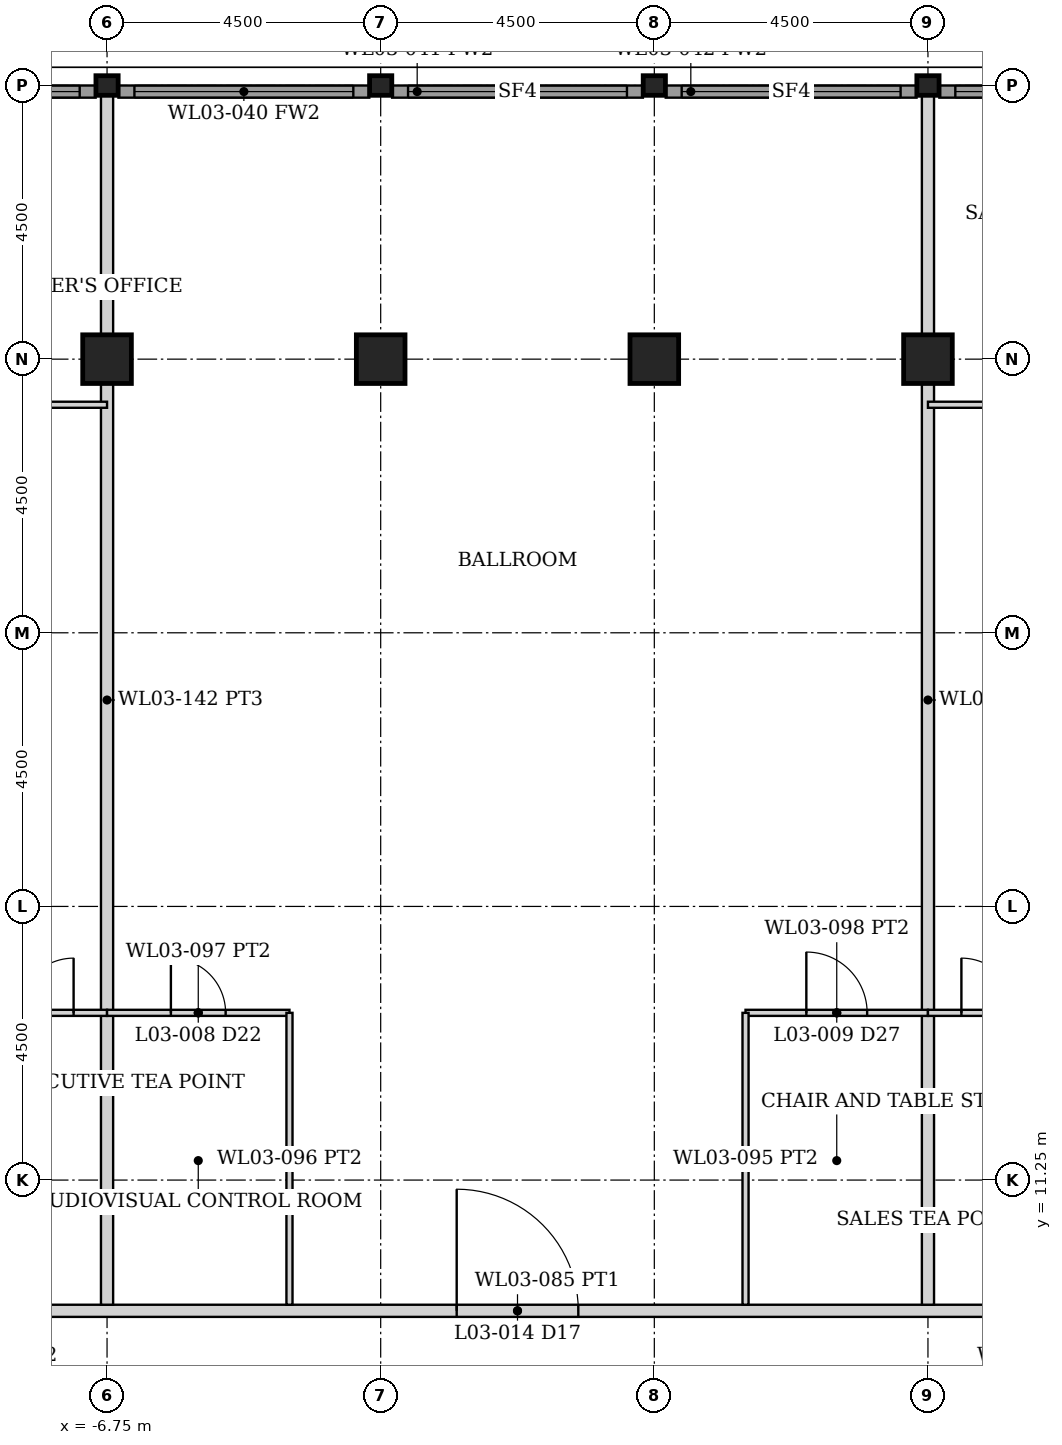
"""IFC4 building model, lengths in metres.
Left out: names, types, materials, properties, quantities, classifications, styles, units other than length and angle.
Written with IfcOpenShell. Run it as: python <this file> out.ifc"""

import sys

from ifc_helpers import new_model, si_unit, direction, frame, frame_2d, origin, origin_2d, place, context, subcontext, project, spatial, rectangle, hollow_rectangle, i_section, extrude, element, fill, save


model = new_model("IFC4")
c1 = context("Model", 3, precision=1e-05, world=origin(), true_north=direction((0.0, 1.0)))
c2 = subcontext(c1, "Body", "Model", "MODEL_VIEW")
j1 = project(units=[si_unit("LENGTHUNIT", "METRE"), si_unit("PLANEANGLEUNIT", "RADIAN")], contexts=[c1])
p1 = place(None, origin())
s1 = spatial("IfcSite", under=j1, at=p1, CompositionType="ELEMENT")
p2 = place(p1, origin())
s2 = spatial("IfcBuilding", under=s1, at=p2, CompositionType="ELEMENT")
p3 = place(p2, frame((0.0, 0.0, 16.0)))
s3 = spatial("IfcBuildingStorey", under=s2, at=p3, CompositionType="ELEMENT", Elevation=16.0)
for number, where, z_axis, x_axis in (
    (1, (-6.75, 24.75, 0.0), (0.0, 0.0, 1.0), (0.0, 1.0, 0.0)),
    (2, (-2.25, 24.75, 0.0), (0.0, 0.0, 1.0), (0.0, 1.0, 0.0)),
    (3, (2.25, 24.75, 0.0), (0.0, 0.0, 1.0), (0.0, 1.0, 0.0)),
    (4, (6.75, 24.75, 0.0), (0.0, 0.0, 1.0), (0.0, 1.0, 0.0)),
):
    element("IfcColumn", number, at=place(p3, frame(where, z_axis=z_axis, x_axis=x_axis)), inside=s3, PredefinedType="COLUMN", context=c2, shape_type="SweptSolid", body=[
        extrude(hollow_rectangle(XDim=0.8, YDim=0.8, WallThickness=0.08, at=origin_2d()), origin(), (0.0, 0.0, 1.0), 5.5),
    ])
for number, where, z_axis, x_axis in (
    (5, (-6.75, 29.25, 0.0), (0.0, 0.0, 1.0), (0.0, 1.0, 0.0)),
    (6, (-2.25, 29.25, 0.0), (0.0, 0.0, 1.0), (0.0, 1.0, 0.0)),
    (7, (2.25, 29.25, 0.0), (0.0, 0.0, 1.0), (0.0, 1.0, 0.0)),
    (8, (6.75, 29.25, 0.0), (0.0, 0.0, 1.0), (0.0, 1.0, 0.0)),
):
    element("IfcColumn", number, at=place(p3, frame(where, z_axis=z_axis, x_axis=x_axis)), inside=s3, PredefinedType="COLUMN", context=c2, shape_type="SweptSolid", body=[
        extrude(i_section(OverallWidth=0.322, OverallDepth=0.365, WebThickness=0.027, FlangeThickness=0.044, FilletRadius=0.015, at=origin_2d()), origin(), (0.0, 0.0, 1.0), 5.5),
    ])
p4 = place(p3, frame((-11.062, 29.15, 0.0), z_axis=(0.0, 0.0, 1.0), x_axis=(1.0, 0.0, 0.0)))
e9 = element("IfcWall", 9, at=p4, inside=s3, PredefinedType="SOLIDWALL", context=c2, shape_type="SweptSolid", body=[
    extrude(rectangle(XDim=4.125, YDim=0.2, at=frame_2d((2.062, 0.0))), origin(), (0.0, 0.0, 1.0), 4.633),
])
p5 = place(p4, frame((0.262, 0.0, 0.15)))
e10 = element("IfcOpeningElement", 10, at=p5, cuts=e9, PredefinedType="OPENING", context=c2, shape_type="SweptSolid", body=[
    extrude(rectangle(XDim=3.6, YDim=4.333, at=frame_2d((1.8, 2.167))), frame((0.0, 0.11, 0.0), z_axis=(0.0, -1.0, 0.0), x_axis=(1.0, 0.0, 0.0)), (0.0, 0.0, 1.0), 0.22),
])
p6 = place(p3, frame((-6.562, 29.15, 0.0), z_axis=(0.0, 0.0, 1.0), x_axis=(1.0, 0.0, 0.0)))
e11 = element("IfcWall", 11, at=p6, inside=s3, PredefinedType="SOLIDWALL", context=c2, shape_type="SweptSolid", body=[
    extrude(rectangle(XDim=4.125, YDim=0.2, at=frame_2d((2.062, 0.0))), origin(), (0.0, 0.0, 1.0), 4.633),
])
p7 = place(p6, frame((0.262, 0.0, 0.15)))
e12 = element("IfcOpeningElement", 12, at=p7, cuts=e11, PredefinedType="OPENING", context=c2, shape_type="SweptSolid", body=[
    extrude(rectangle(XDim=3.6, YDim=4.333, at=frame_2d((1.8, 2.167))), frame((0.0, 0.11, 0.0), z_axis=(0.0, -1.0, 0.0), x_axis=(1.0, 0.0, 0.0)), (0.0, 0.0, 1.0), 0.22),
])
p8 = place(p3, frame((-2.062, 29.15, 0.0), z_axis=(0.0, 0.0, 1.0), x_axis=(1.0, 0.0, 0.0)))
e13 = element("IfcWall", 13, at=p8, inside=s3, PredefinedType="SOLIDWALL", context=c2, shape_type="SweptSolid", body=[
    extrude(rectangle(XDim=4.125, YDim=0.2, at=frame_2d((2.062, 0.0))), origin(), (0.0, 0.0, 1.0), 4.633),
])
p9 = place(p8, frame((0.262, 0.0, 0.15)))
e14 = element("IfcOpeningElement", 14, at=p9, cuts=e13, PredefinedType="OPENING", context=c2, shape_type="SweptSolid", body=[
    extrude(rectangle(XDim=3.6, YDim=4.333, at=frame_2d((1.8, 2.167))), frame((0.0, 0.11, 0.0), z_axis=(0.0, -1.0, 0.0), x_axis=(1.0, 0.0, 0.0)), (0.0, 0.0, 1.0), 0.22),
])
p10 = place(p3, frame((2.438, 29.15, 0.0), z_axis=(0.0, 0.0, 1.0), x_axis=(1.0, 0.0, 0.0)))
e15 = element("IfcWall", 15, at=p10, inside=s3, PredefinedType="SOLIDWALL", context=c2, shape_type="SweptSolid", body=[
    extrude(rectangle(XDim=4.125, YDim=0.2, at=frame_2d((2.062, 0.0))), origin(), (0.0, 0.0, 1.0), 4.633),
])
p11 = place(p10, frame((0.262, 0.0, 0.15)))
e16 = element("IfcOpeningElement", 16, at=p11, cuts=e15, PredefinedType="OPENING", context=c2, shape_type="SweptSolid", body=[
    extrude(rectangle(XDim=3.6, YDim=4.333, at=frame_2d((1.8, 2.167))), frame((0.0, 0.11, 0.0), z_axis=(0.0, -1.0, 0.0), x_axis=(1.0, 0.0, 0.0)), (0.0, 0.0, 1.0), 0.22),
])
p12 = place(p3, frame((6.938, 29.15, 0.0), z_axis=(0.0, 0.0, 1.0), x_axis=(1.0, 0.0, 0.0)))
e17 = element("IfcWall", 17, at=p12, inside=s3, PredefinedType="SOLIDWALL", context=c2, shape_type="SweptSolid", body=[
    extrude(rectangle(XDim=4.125, YDim=0.2, at=frame_2d((2.062, 0.0))), origin(), (0.0, 0.0, 1.0), 4.633),
])
p13 = place(p12, frame((0.262, 0.0, 0.15)))
e18 = element("IfcOpeningElement", 18, at=p13, cuts=e17, PredefinedType="OPENING", context=c2, shape_type="SweptSolid", body=[
    extrude(rectangle(XDim=3.6, YDim=4.333, at=frame_2d((1.8, 2.167))), frame((0.0, 0.11, 0.0), z_axis=(0.0, -1.0, 0.0), x_axis=(1.0, 0.0, 0.0)), (0.0, 0.0, 1.0), 0.22),
])
p14 = place(p3, frame((-25.075, 9.1, 0.0), z_axis=(0.0, 0.0, 1.0), x_axis=(1.0, 0.0, 0.0)))
e19 = element("IfcWall", 19, at=p14, inside=s3, PredefinedType="PARTITIONING", context=c2, shape_type="SweptSolid", body=[
    extrude(rectangle(XDim=50.15, YDim=0.2, at=frame_2d((25.075, 0.0))), origin(), (0.0, 0.0, 1.0), 4.329),
])
p15 = place(p14, frame((6.85, 0.0, 0.0)))
e20 = element("IfcOpeningElement", 20, at=p15, cuts=e19, PredefinedType="OPENING", context=c2, shape_type="SweptSolid", body=[
    extrude(rectangle(XDim=0.9, YDim=2.1, at=frame_2d((0.45, 1.05))), frame((0.0, 0.11, 0.0), z_axis=(0.0, -1.0, 0.0), x_axis=(1.0, 0.0, 0.0)), (0.0, 0.0, 1.0), 0.22),
])
p16 = place(p14, frame((24.075, 0.0, 0.0)))
e21 = element("IfcOpeningElement", 21, at=p16, cuts=e19, PredefinedType="OPENING", context=c2, shape_type="SweptSolid", body=[
    extrude(rectangle(XDim=2.0, YDim=2.4, at=frame_2d((1.0, 1.2))), frame((0.0, 0.11, 0.0), z_axis=(0.0, -1.0, 0.0), x_axis=(1.0, 0.0, 0.0)), (0.0, 0.0, 1.0), 0.22),
])
p17 = place(p14, frame((42.4, 0.0, 0.0)))
e22 = element("IfcOpeningElement", 22, at=p17, cuts=e19, PredefinedType="OPENING", context=c2, shape_type="SweptSolid", body=[
    extrude(rectangle(XDim=0.9, YDim=2.1, at=frame_2d((0.45, 1.05))), frame((0.0, 0.11, 0.0), z_axis=(0.0, -1.0, 0.0), x_axis=(1.0, 0.0, 0.0)), (0.0, 0.0, 1.0), 0.22),
])
for number, where, z_axis, x_axis in (
    (23, (-6.75, 9.2, 0.0), (0.0, 0.0, 1.0), (0.0, 1.0, 0.0)),
    (24, (6.75, 9.2, 0.0), (0.0, 0.0, 1.0), (0.0, 1.0, 0.0)),
):
    element("IfcWall", number, at=place(p3, frame(where, z_axis=z_axis, x_axis=x_axis)), inside=s3, PredefinedType="PARTITIONING", context=c2, shape_type="SweptSolid", body=[
        extrude(rectangle(XDim=19.889, YDim=0.2, at=frame_2d((9.944, 0.0))), origin(), (0.0, 0.0, 1.0), 4.329),
    ])
p18 = place(p3, frame((-15.75, 14.0, 0.0), z_axis=(0.0, 0.0, 1.0), x_axis=(1.0, 0.0, 0.0)))
e25 = element("IfcWall", 25, at=p18, inside=s3, PredefinedType="PARTITIONING", context=c2, shape_type="SweptSolid", body=[
    extrude(rectangle(XDim=9.0, YDim=0.1, at=frame_2d((4.5, 0.0))), origin(), (0.0, 0.0, 1.0), 4.329),
])
p19 = place(p18, frame((1.95, 0.0, 0.0)))
e26 = element("IfcOpeningElement", 26, at=p19, cuts=e25, PredefinedType="OPENING", context=c2, shape_type="SweptSolid", body=[
    extrude(rectangle(XDim=0.9, YDim=2.1, at=frame_2d((0.45, 1.05))), frame((0.0, 0.06, 0.0), z_axis=(0.0, -1.0, 0.0), x_axis=(1.0, 0.0, 0.0)), (0.0, 0.0, 1.0), 0.12),
])
p20 = place(p18, frame((5.4, 0.0, 0.0)))
e27 = element("IfcOpeningElement", 27, at=p20, cuts=e25, PredefinedType="OPENING", context=c2, shape_type="SweptSolid", body=[
    extrude(rectangle(XDim=1.0, YDim=2.1, at=frame_2d((0.5, 1.05))), frame((0.0, 0.06, 0.0), z_axis=(0.0, -1.0, 0.0), x_axis=(1.0, 0.0, 0.0)), (0.0, 0.0, 1.0), 0.12),
])
p21 = place(p18, frame((7.55, 0.0, 0.0)))
e28 = element("IfcOpeningElement", 28, at=p21, cuts=e25, PredefinedType="OPENING", context=c2, shape_type="SweptSolid", body=[
    extrude(rectangle(XDim=0.9, YDim=2.1, at=frame_2d((0.45, 1.05))), frame((0.0, 0.06, 0.0), z_axis=(0.0, -1.0, 0.0), x_axis=(1.0, 0.0, 0.0)), (0.0, 0.0, 1.0), 0.12),
])
p22 = place(p3, frame((-11.25, 24.0, 0.0), z_axis=(0.0, 0.0, 1.0), x_axis=(1.0, 0.0, 0.0)))
e29 = element("IfcWall", 29, at=p22, inside=s3, PredefinedType="PARTITIONING", context=c2, shape_type="SweptSolid", body=[
    extrude(rectangle(XDim=4.5, YDim=0.1, at=frame_2d((2.25, 0.0))), origin(), (0.0, 0.0, 1.0), 4.329),
])
p23 = place(p22, frame((1.8, 0.0, 0.0)))
e30 = element("IfcOpeningElement", 30, at=p23, cuts=e29, PredefinedType="OPENING", context=c2, shape_type="SweptSolid", body=[
    extrude(rectangle(XDim=0.9, YDim=2.1, at=frame_2d((0.45, 1.05))), frame((0.0, 0.06, 0.0), z_axis=(0.0, -1.0, 0.0), x_axis=(1.0, 0.0, 0.0)), (0.0, 0.0, 1.0), 0.12),
])
p24 = place(p3, frame((-6.75, 14.0, 0.0), z_axis=(0.0, 0.0, 1.0), x_axis=(1.0, 0.0, 0.0)))
e31 = element("IfcWall", 31, at=p24, inside=s3, PredefinedType="PARTITIONING", context=c2, shape_type="SweptSolid", body=[
    extrude(rectangle(XDim=3.0, YDim=0.1, at=frame_2d((1.5, 0.0))), origin(), (0.0, 0.0, 1.0), 4.329),
])
p25 = place(p24, frame((1.05, 0.0, 0.0)))
e32 = element("IfcOpeningElement", 32, at=p25, cuts=e31, PredefinedType="OPENING", context=c2, shape_type="SweptSolid", body=[
    extrude(rectangle(XDim=0.9, YDim=2.1, at=frame_2d((0.45, 1.05))), frame((0.0, 0.06, 0.0), z_axis=(0.0, -1.0, 0.0), x_axis=(1.0, 0.0, 0.0)), (0.0, 0.0, 1.0), 0.12),
])
p26 = place(p3, frame((3.75, 14.0, 0.0), z_axis=(0.0, 0.0, 1.0), x_axis=(1.0, 0.0, 0.0)))
e33 = element("IfcWall", 33, at=p26, inside=s3, PredefinedType="PARTITIONING", context=c2, shape_type="SweptSolid", body=[
    extrude(rectangle(XDim=3.0, YDim=0.1, at=frame_2d((1.5, 0.0))), origin(), (0.0, 0.0, 1.0), 4.329),
])
p27 = place(p26, frame((1.0, 0.0, 0.0)))
e34 = element("IfcOpeningElement", 34, at=p27, cuts=e33, PredefinedType="OPENING", context=c2, shape_type="SweptSolid", body=[
    extrude(rectangle(XDim=1.0, YDim=2.1, at=frame_2d((0.5, 1.05))), frame((0.0, 0.06, 0.0), z_axis=(0.0, -1.0, 0.0), x_axis=(1.0, 0.0, 0.0)), (0.0, 0.0, 1.0), 0.12),
])
for number, where, z_axis, x_axis in (
    (35, (-3.75, 9.2, 0.0), (0.0, 0.0, 1.0), (0.0, 1.0, 0.0)),
    (36, (3.75, 9.2, 0.0), (0.0, 0.0, 1.0), (0.0, 1.0, 0.0)),
):
    element("IfcWall", number, at=place(p3, frame(where, z_axis=z_axis, x_axis=x_axis)), inside=s3, PredefinedType="PARTITIONING", context=c2, shape_type="SweptSolid", body=[
        extrude(rectangle(XDim=4.8, YDim=0.1, at=frame_2d((2.4, 0.0))), origin(), (0.0, 0.0, 1.0), 4.329),
    ])
p28 = place(p3, frame((6.75, 14.0, 0.0), z_axis=(0.0, 0.0, 1.0), x_axis=(1.0, 0.0, 0.0)))
e37 = element("IfcWall", 37, at=p28, inside=s3, PredefinedType="PARTITIONING", context=c2, shape_type="SweptSolid", body=[
    extrude(rectangle(XDim=9.0, YDim=0.1, at=frame_2d((4.5, 0.0))), origin(), (0.0, 0.0, 1.0), 4.329),
])
p29 = place(p28, frame((6.15, 0.0, 0.0)))
e38 = element("IfcOpeningElement", 38, at=p29, cuts=e37, PredefinedType="OPENING", context=c2, shape_type="SweptSolid", body=[
    extrude(rectangle(XDim=0.9, YDim=2.1, at=frame_2d((0.45, 1.05))), frame((0.0, 0.06, 0.0), z_axis=(0.0, -1.0, 0.0), x_axis=(1.0, 0.0, 0.0)), (0.0, 0.0, 1.0), 0.12),
])
p30 = place(p28, frame((2.6, 0.0, 0.0)))
e39 = element("IfcOpeningElement", 39, at=p30, cuts=e37, PredefinedType="OPENING", context=c2, shape_type="SweptSolid", body=[
    extrude(rectangle(XDim=1.0, YDim=2.1, at=frame_2d((0.5, 1.05))), frame((0.0, 0.06, 0.0), z_axis=(0.0, -1.0, 0.0), x_axis=(1.0, 0.0, 0.0)), (0.0, 0.0, 1.0), 0.12),
])
p31 = place(p28, frame((0.55, 0.0, 0.0)))
e40 = element("IfcOpeningElement", 40, at=p31, cuts=e37, PredefinedType="OPENING", context=c2, shape_type="SweptSolid", body=[
    extrude(rectangle(XDim=0.9, YDim=2.1, at=frame_2d((0.45, 1.05))), frame((0.0, 0.06, 0.0), z_axis=(0.0, -1.0, 0.0), x_axis=(1.0, 0.0, 0.0)), (0.0, 0.0, 1.0), 0.12),
])
p32 = place(p3, frame((6.75, 24.0, 0.0), z_axis=(0.0, 0.0, 1.0), x_axis=(1.0, 0.0, 0.0)))
e41 = element("IfcWall", 41, at=p32, inside=s3, PredefinedType="PARTITIONING", context=c2, shape_type="SweptSolid", body=[
    extrude(rectangle(XDim=4.5, YDim=0.1, at=frame_2d((2.25, 0.0))), origin(), (0.0, 0.0, 1.0), 4.329),
])
p33 = place(p32, frame((1.8, 0.0, 0.0)))
e42 = element("IfcOpeningElement", 42, at=p33, cuts=e41, PredefinedType="OPENING", context=c2, shape_type="SweptSolid", body=[
    extrude(rectangle(XDim=0.9, YDim=2.1, at=frame_2d((0.45, 1.05))), frame((0.0, 0.06, 0.0), z_axis=(0.0, -1.0, 0.0), x_axis=(1.0, 0.0, 0.0)), (0.0, 0.0, 1.0), 0.12),
])
p34 = place(p5, origin())
e43 = element("IfcWindow", 43, at=p34, inside=s3, PartitioningType="SINGLE_PANEL", PredefinedType="WINDOW", context=c2, shape_type="SweptSolid", body=[
    extrude(rectangle(XDim=3.6, YDim=4.333, at=frame_2d((1.8, 2.167))), frame((0.0, 0.03, 0.0), z_axis=(0.0, -1.0, 0.0), x_axis=(1.0, 0.0, 0.0)), (0.0, 0.0, 1.0), 0.06),
])
fill(e10, e43)
p35 = place(p7, origin())
e44 = element("IfcWindow", 44, at=p35, inside=s3, PartitioningType="SINGLE_PANEL", PredefinedType="WINDOW", context=c2, shape_type="SweptSolid", body=[
    extrude(rectangle(XDim=3.6, YDim=4.333, at=frame_2d((1.8, 2.167))), frame((0.0, 0.03, 0.0), z_axis=(0.0, -1.0, 0.0), x_axis=(1.0, 0.0, 0.0)), (0.0, 0.0, 1.0), 0.06),
])
fill(e12, e44)
p36 = place(p9, origin())
e45 = element("IfcWindow", 45, at=p36, inside=s3, PartitioningType="SINGLE_PANEL", PredefinedType="WINDOW", context=c2, shape_type="SweptSolid", body=[
    extrude(rectangle(XDim=3.6, YDim=4.333, at=frame_2d((1.8, 2.167))), frame((0.0, 0.03, 0.0), z_axis=(0.0, -1.0, 0.0), x_axis=(1.0, 0.0, 0.0)), (0.0, 0.0, 1.0), 0.06),
])
fill(e14, e45)
p37 = place(p11, origin())
e46 = element("IfcWindow", 46, at=p37, inside=s3, PartitioningType="SINGLE_PANEL", PredefinedType="WINDOW", context=c2, shape_type="SweptSolid", body=[
    extrude(rectangle(XDim=3.6, YDim=4.333, at=frame_2d((1.8, 2.167))), frame((0.0, 0.03, 0.0), z_axis=(0.0, -1.0, 0.0), x_axis=(1.0, 0.0, 0.0)), (0.0, 0.0, 1.0), 0.06),
])
fill(e16, e46)
p38 = place(p13, origin())
e47 = element("IfcWindow", 47, at=p38, inside=s3, PartitioningType="SINGLE_PANEL", PredefinedType="WINDOW", context=c2, shape_type="SweptSolid", body=[
    extrude(rectangle(XDim=3.6, YDim=4.333, at=frame_2d((1.8, 2.167))), frame((0.0, 0.03, 0.0), z_axis=(0.0, -1.0, 0.0), x_axis=(1.0, 0.0, 0.0)), (0.0, 0.0, 1.0), 0.06),
])
fill(e18, e47)
p39 = place(p21, origin())
e48 = element("IfcDoor", 48, at=p39, inside=s3, OperationType="SINGLE_SWING_RIGHT", PredefinedType="DOOR", context=c2, shape_type="SweptSolid", body=[
    extrude(rectangle(XDim=0.9, YDim=2.1, at=frame_2d((0.45, 1.05))), frame((0.0, 0.025, 0.0), z_axis=(0.0, -1.0, 0.0), x_axis=(1.0, 0.0, 0.0)), (0.0, 0.0, 1.0), 0.05),
])
fill(e28, e48)
p40 = place(p25, origin())
e49 = element("IfcDoor", 49, at=p40, inside=s3, OperationType="SINGLE_SWING_LEFT", PredefinedType="DOOR", context=c2, shape_type="SweptSolid", body=[
    extrude(rectangle(XDim=0.9, YDim=2.1, at=frame_2d((0.45, 1.05))), frame((0.0, 0.025, 0.0), z_axis=(0.0, -1.0, 0.0), x_axis=(1.0, 0.0, 0.0)), (0.0, 0.0, 1.0), 0.05),
])
fill(e32, e49)
p41 = place(p27, origin())
e50 = element("IfcDoor", 50, at=p41, inside=s3, OperationType="SINGLE_SWING_LEFT", PredefinedType="DOOR", context=c2, shape_type="SweptSolid", body=[
    extrude(rectangle(XDim=1.0, YDim=2.1, at=frame_2d((0.5, 1.05))), frame((0.0, 0.025, 0.0), z_axis=(0.0, -1.0, 0.0), x_axis=(1.0, 0.0, 0.0)), (0.0, 0.0, 1.0), 0.05),
])
fill(e34, e50)
p42 = place(p16, origin())
e51 = element("IfcDoor", 51, at=p42, inside=s3, OperationType="SINGLE_SWING_LEFT", PredefinedType="DOOR", context=c2, shape_type="SweptSolid", body=[
    extrude(rectangle(XDim=2.0, YDim=2.4, at=frame_2d((1.0, 1.2))), frame((0.0, 0.025, 0.0), z_axis=(0.0, -1.0, 0.0), x_axis=(1.0, 0.0, 0.0)), (0.0, 0.0, 1.0), 0.05),
])
fill(e21, e51)
p43 = place(p31, origin())
e52 = element("IfcDoor", 52, at=p43, inside=s3, OperationType="SINGLE_SWING_LEFT", PredefinedType="DOOR", context=c2, shape_type="SweptSolid", body=[
    extrude(rectangle(XDim=0.9, YDim=2.1, at=frame_2d((0.45, 1.05))), frame((0.0, 0.025, 0.0), z_axis=(0.0, -1.0, 0.0), x_axis=(1.0, 0.0, 0.0)), (0.0, 0.0, 1.0), 0.05),
])
fill(e40, e52)
save(model, sys.argv[1])
